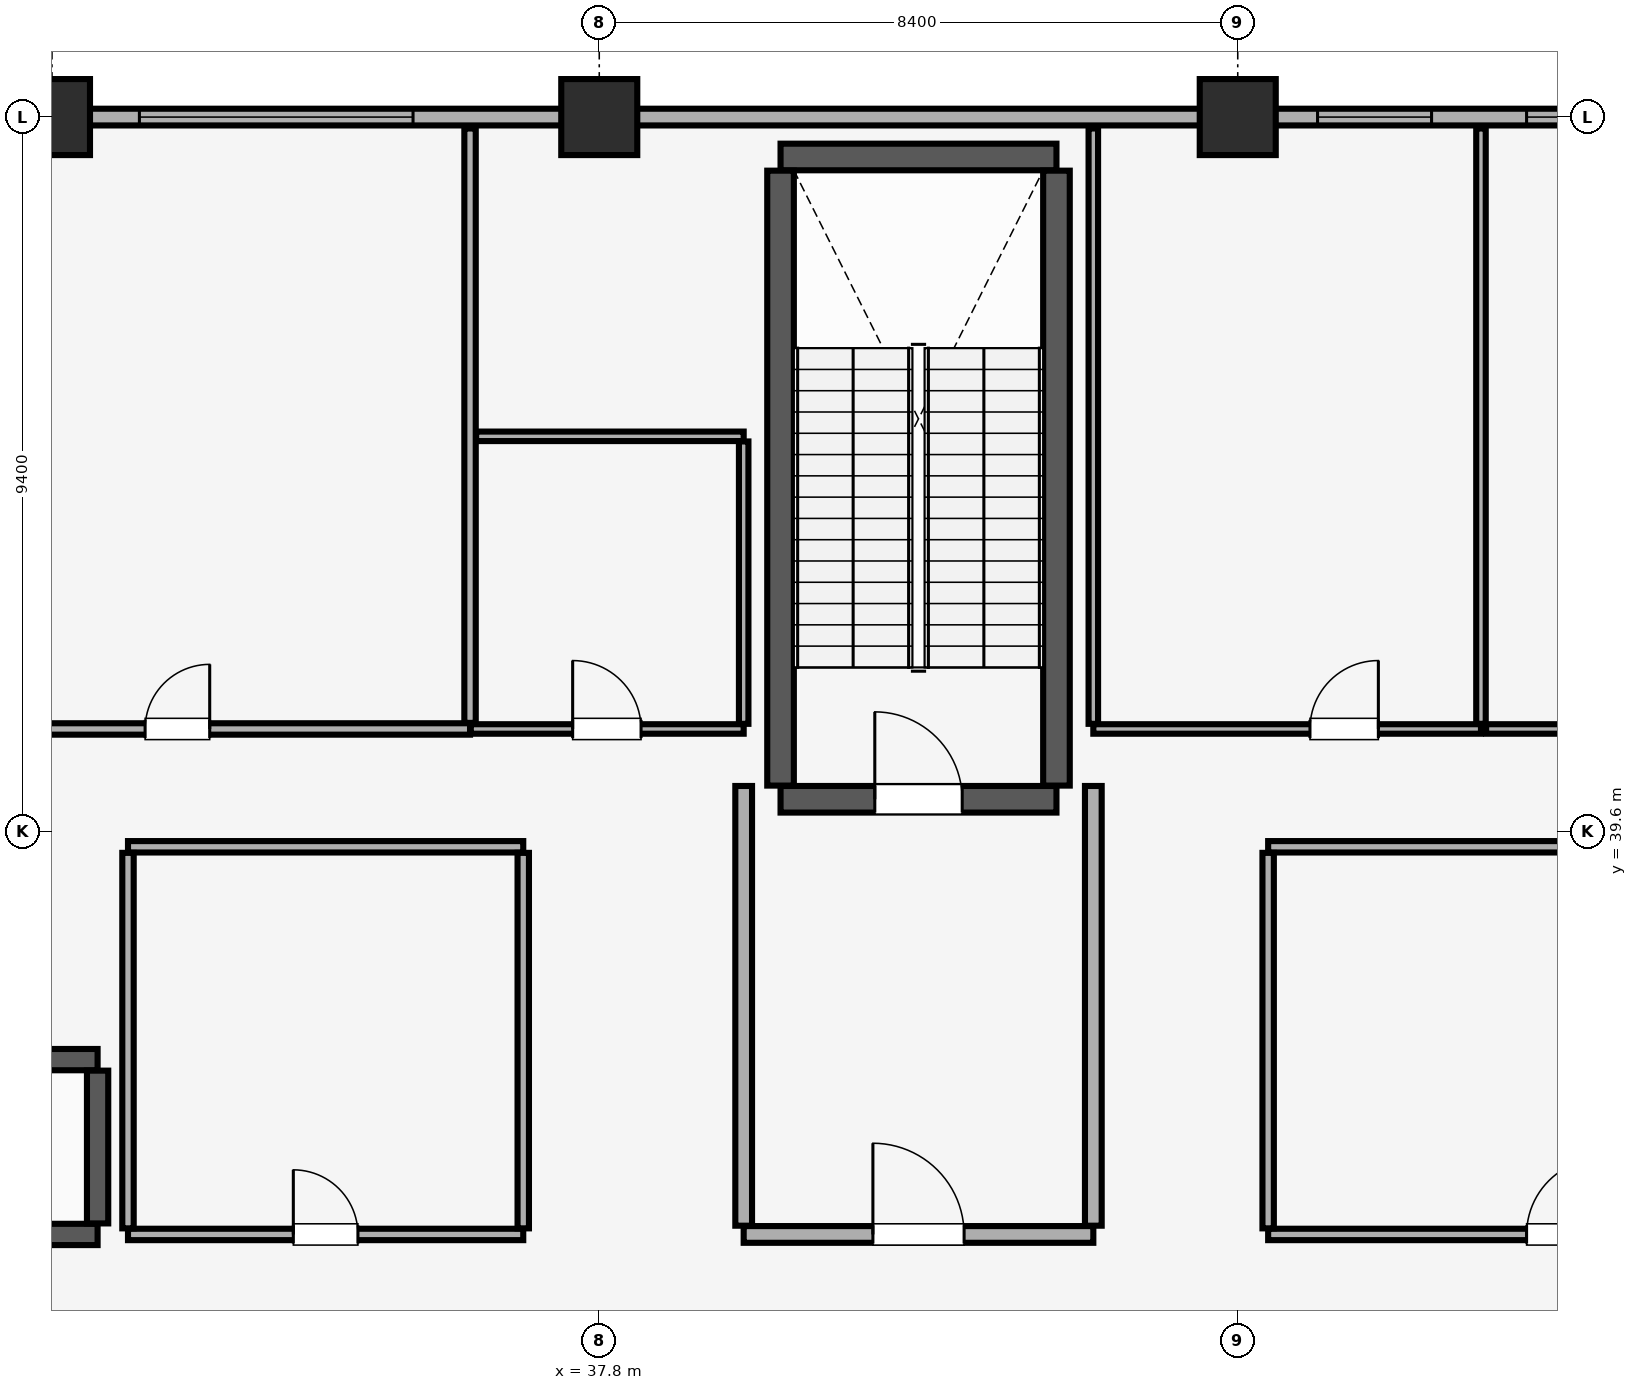
"""IFC4 building model, lengths in metres.
Left out: names, types, materials, properties, quantities, classifications, styles, units other than length and angle.
Written with IfcOpenShell. Run it as: python <this file> out.ifc"""

import sys

from ifc_helpers import new_model, si_unit, direction, frame, frame_2d, origin, origin_2d, place, context, subcontext, project, spatial, rectangle, extrude, element, fill, save


model = new_model("IFC4")
c1 = context("Model", 3, precision=1e-05, world=origin(), true_north=direction((0.0, 1.0)))
c2 = subcontext(c1, "Body", "Model", "MODEL_VIEW")
j1 = project(units=[si_unit("LENGTHUNIT", "METRE"), si_unit("PLANEANGLEUNIT", "RADIAN")], contexts=[c1])
p1 = place(None, origin())
s1 = spatial("IfcSite", under=j1, at=p1, CompositionType="ELEMENT")
p2 = place(p1, origin())
s2 = spatial("IfcBuilding", under=s1, at=p2, CompositionType="ELEMENT")
p3 = place(p2, frame((0.0, 0.0, 294.7)))
s3 = spatial("IfcBuildingStorey", under=s2, at=p3, CompositionType="ELEMENT", Elevation=294.7)
for number, where, z_axis, x_axis in (
    (1, (30.6, 49.0, 0.0), (0.0, 0.0, 1.0), (1.0, 0.0, 0.0)),
    (2, (37.8, 49.0, 0.0), (0.0, 0.0, 1.0), (1.0, 0.0, 0.0)),
    (3, (46.2, 49.0, 0.0), (0.0, 0.0, 1.0), (1.0, 0.0, 0.0)),
):
    element("IfcColumn", number, at=place(p3, frame(where, z_axis=z_axis, x_axis=x_axis)), inside=s3, PredefinedType="COLUMN", context=c2, shape_type="SweptSolid", body=[
        extrude(rectangle(XDim=1.0, YDim=1.0, at=origin_2d()), origin(), (0.0, 0.0, 1.0), 5.12),
    ])
p4 = place(p3, frame((71.4, 49.0, 0.0), z_axis=(0.0, 0.0, 1.0), x_axis=(-1.0, 0.0, 0.0)))
e4 = element("IfcWall", 4, at=p4, inside=s3, PredefinedType="SOLIDWALL", context=c2, shape_type="SweptSolid", body=[
    extrude(rectangle(XDim=58.8, YDim=0.22, at=frame_2d((29.4, 0.0))), origin(), (0.0, 0.0, 1.0), 4.32),
])
p5 = place(p4, frame((56.365, 0.0, 0.85)))
e5 = element("IfcOpeningElement", 5, at=p5, cuts=e4, PredefinedType="OPENING", context=c2, shape_type="SweptSolid", body=[
    extrude(rectangle(XDim=1.5, YDim=1.4, at=frame_2d((0.75, 0.7))), frame((0.0, 0.12, 0.0), z_axis=(0.0, -1.0, 0.0), x_axis=(1.0, 0.0, 0.0)), (0.0, 0.0, 1.0), 0.24),
])
p6 = place(p4, frame((0.935, 0.0, 0.85)))
e6 = element("IfcOpeningElement", 6, at=p6, cuts=e4, PredefinedType="OPENING", context=c2, shape_type="SweptSolid", body=[
    extrude(rectangle(XDim=1.5, YDim=1.4, at=frame_2d((0.75, 0.7))), frame((0.0, 0.12, 0.0), z_axis=(0.0, -1.0, 0.0), x_axis=(1.0, 0.0, 0.0)), (0.0, 0.0, 1.0), 0.24),
])
p7 = place(p4, frame((43.865, 0.0, 0.9)))
e7 = element("IfcOpeningElement", 7, at=p7, cuts=e4, PredefinedType="OPENING", context=c2, shape_type="SweptSolid", body=[
    extrude(rectangle(XDim=1.5, YDim=1.4, at=frame_2d((0.75, 0.7))), frame((0.0, 0.12, 0.0), z_axis=(0.0, -1.0, 0.0), x_axis=(1.0, 0.0, 0.0)), (0.0, 0.0, 1.0), 0.24),
])
p8 = place(p4, frame((36.05, 0.0, 0.9)))
e8 = element("IfcOpeningElement", 8, at=p8, cuts=e4, PredefinedType="OPENING", context=c2, shape_type="SweptSolid", body=[
    extrude(rectangle(XDim=3.6, YDim=1.5, at=frame_2d((1.8, 0.75))), frame((0.0, 0.12, 0.0), z_axis=(0.0, -1.0, 0.0), x_axis=(1.0, 0.0, 0.0)), (0.0, 0.0, 1.0), 0.24),
])
p9 = place(p4, frame((22.65, 0.0, 0.9)))
e9 = element("IfcOpeningElement", 9, at=p9, cuts=e4, PredefinedType="OPENING", context=c2, shape_type="SweptSolid", body=[
    extrude(rectangle(XDim=1.5, YDim=1.4, at=frame_2d((0.75, 0.7))), frame((0.0, 0.12, 0.0), z_axis=(0.0, -1.0, 0.0), x_axis=(1.0, 0.0, 0.0)), (0.0, 0.0, 1.0), 0.24),
])
p10 = place(p4, frame((19.0, 0.0, 0.9)))
e10 = element("IfcOpeningElement", 10, at=p10, cuts=e4, PredefinedType="OPENING", context=c2, shape_type="SweptSolid", body=[
    extrude(rectangle(XDim=2.4, YDim=1.5, at=frame_2d((1.2, 0.75))), frame((0.0, 0.12, 0.0), z_axis=(0.0, -1.0, 0.0), x_axis=(1.0, 0.0, 0.0)), (0.0, 0.0, 1.0), 0.24),
])
p11 = place(p4, frame((14.635, 0.0, 0.9)))
e11 = element("IfcOpeningElement", 11, at=p11, cuts=e4, PredefinedType="OPENING", context=c2, shape_type="SweptSolid", body=[
    extrude(rectangle(XDim=2.4, YDim=1.5, at=frame_2d((1.2, 0.75))), frame((0.0, 0.12, 0.0), z_axis=(0.0, -1.0, 0.0), x_axis=(1.0, 0.0, 0.0)), (0.0, 0.0, 1.0), 0.24),
])
p12 = place(p3, frame((40.185, 40.025, 0.0), z_axis=(0.0, 0.0, 1.0), x_axis=(1.0, 0.0, 0.0)))
e12 = element("IfcWall", 12, at=p12, inside=s3, PredefinedType="SHEAR", context=c2, shape_type="SweptSolid", body=[
    extrude(rectangle(XDim=3.63, YDim=0.35, at=frame_2d((1.815, 0.0))), origin(), (0.0, 0.0, 1.0), 5.12),
])
p13 = place(p12, frame((1.24, 0.0, 0.0)))
e13 = element("IfcOpeningElement", 13, at=p13, cuts=e12, PredefinedType="OPENING", context=c2, shape_type="SweptSolid", body=[
    extrude(rectangle(XDim=1.15, YDim=2.15, at=frame_2d((0.575, 1.075))), frame((0.0, 0.185, 0.0), z_axis=(0.0, -1.0, 0.0), x_axis=(1.0, 0.0, 0.0)), (0.0, 0.0, 1.0), 0.37),
])
p14 = place(p3, frame((40.185, 48.475, 0.0), z_axis=(0.0, 0.0, 1.0), x_axis=(1.0, 0.0, 0.0)))
e14 = element("IfcWall", 14, at=p14, inside=s3, PredefinedType="SHEAR", context=c2, shape_type="SweptSolid", body=[
    extrude(rectangle(XDim=3.63, YDim=0.35, at=frame_2d((1.815, 0.0))), origin(), (0.0, 0.0, 1.0), 5.12),
])
for number, where, z_axis, x_axis in (
    (15, (40.185, 40.205, 0.0), (0.0, 0.0, 1.0), (0.0, 1.0, 0.0)),
    (16, (43.815, 40.205, 0.0), (0.0, 0.0, 1.0), (0.0, 1.0, 0.0)),
):
    element("IfcWall", number, at=place(p3, frame(where, z_axis=z_axis, x_axis=x_axis)), inside=s3, PredefinedType="SHEAR", context=c2, shape_type="SweptSolid", body=[
        extrude(rectangle(XDim=8.09, YDim=0.35, at=frame_2d((4.045, 0.0))), origin(), (0.0, 0.0, 1.0), 5.12),
    ])
for number, where, z_axis, x_axis in (
    (17, (28.9, 34.3, 0.0), (0.0, 0.0, 1.0), (1.0, 0.0, 0.0)),
    (18, (28.9, 36.6, 0.0), (0.0, 0.0, 1.0), (1.0, 0.0, 0.0)),
):
    element("IfcWall", number, at=place(p3, frame(where, z_axis=z_axis, x_axis=x_axis)), inside=s3, PredefinedType="SHEAR", context=c2, shape_type="SweptSolid", body=[
        extrude(rectangle(XDim=2.3, YDim=0.28, at=frame_2d((1.15, 0.0))), origin(), (0.0, 0.0, 1.0), 5.12),
    ])
p15 = place(p3, frame((31.2, 34.445, 0.0), z_axis=(0.0, 0.0, 1.0), x_axis=(0.0, 1.0, 0.0)))
e19 = element("IfcWall", 19, at=p15, inside=s3, PredefinedType="SHEAR", context=c2, shape_type="SweptSolid", body=[
    extrude(rectangle(XDim=2.01, YDim=0.28, at=frame_2d((1.005, 0.0))), origin(), (0.0, 0.0, 1.0), 5.12),
])
p16 = place(p3, frame((39.7, 34.3, 0.0), z_axis=(0.0, 0.0, 1.0), x_axis=(1.0, 0.0, 0.0)))
e20 = element("IfcWall", 20, at=p16, inside=s3, PredefinedType="PARTITIONING", context=c2, shape_type="SweptSolid", body=[
    extrude(rectangle(XDim=4.6, YDim=0.22, at=frame_2d((2.3, 0.0))), origin(), (0.0, 0.0, 1.0), 5.12),
])
p17 = place(p16, frame((1.7, 0.0, 0.0)))
e21 = element("IfcOpeningElement", 21, at=p17, cuts=e20, PredefinedType="OPENING", context=c2, shape_type="SweptSolid", body=[
    extrude(rectangle(XDim=1.2, YDim=2.15, at=frame_2d((0.6, 1.075))), frame((0.0, 0.12, 0.0), z_axis=(0.0, -1.0, 0.0), x_axis=(1.0, 0.0, 0.0)), (0.0, 0.0, 1.0), 0.24),
])
for number, where, z_axis, x_axis in (
    (22, (39.7, 34.415, 0.0), (0.0, 0.0, 1.0), (0.0, 1.0, 0.0)),
    (23, (44.3, 34.415, 0.0), (0.0, 0.0, 1.0), (0.0, 1.0, 0.0)),
):
    element("IfcWall", number, at=place(p3, frame(where, z_axis=z_axis, x_axis=x_axis)), inside=s3, PredefinedType="PARTITIONING", context=c2, shape_type="SweptSolid", body=[
        extrude(rectangle(XDim=5.785, YDim=0.22, at=frame_2d((2.893, 0.0))), origin(), (0.0, 0.0, 1.0), 5.12),
    ])
p18 = place(p3, frame((31.6, 34.3, 0.0), z_axis=(0.0, 0.0, 1.0), x_axis=(1.0, 0.0, 0.0)))
e24 = element("IfcWall", 24, at=p18, inside=s3, PredefinedType="PARTITIONING", context=c2, shape_type="SweptSolid", body=[
    extrude(rectangle(XDim=5.2, YDim=0.15, at=frame_2d((2.6, 0.0))), origin(), (0.0, 0.0, 1.0), 5.12),
])
p19 = place(p18, frame((2.175, 0.0, 0.0)))
e25 = element("IfcOpeningElement", 25, at=p19, cuts=e24, PredefinedType="OPENING", context=c2, shape_type="SweptSolid", body=[
    extrude(rectangle(XDim=0.85, YDim=2.1, at=frame_2d((0.425, 1.05))), frame((0.0, 0.085, 0.0), z_axis=(0.0, -1.0, 0.0), x_axis=(1.0, 0.0, 0.0)), (0.0, 0.0, 1.0), 0.17),
])
p20 = place(p3, frame((31.6, 39.4, 0.0), z_axis=(0.0, 0.0, 1.0), x_axis=(1.0, 0.0, 0.0)))
e26 = element("IfcWall", 26, at=p20, inside=s3, PredefinedType="PARTITIONING", context=c2, shape_type="SweptSolid", body=[
    extrude(rectangle(XDim=5.2, YDim=0.15, at=frame_2d((2.6, 0.0))), origin(), (0.0, 0.0, 1.0), 5.12),
])
for number, where, z_axis, x_axis in (
    (27, (31.6, 34.38, 0.0), (0.0, 0.0, 1.0), (0.0, 1.0, 0.0)),
    (28, (36.8, 34.38, 0.0), (0.0, 0.0, 1.0), (0.0, 1.0, 0.0)),
):
    element("IfcWall", number, at=place(p3, frame(where, z_axis=z_axis, x_axis=x_axis)), inside=s3, PredefinedType="PARTITIONING", context=c2, shape_type="SweptSolid", body=[
        extrude(rectangle(XDim=4.94, YDim=0.15, at=frame_2d((2.47, 0.0))), origin(), (0.0, 0.0, 1.0), 5.12),
    ])
p21 = place(p3, frame((46.6, 34.3, 0.0), z_axis=(0.0, 0.0, 1.0), x_axis=(1.0, 0.0, 0.0)))
e29 = element("IfcWall", 29, at=p21, inside=s3, PredefinedType="PARTITIONING", context=c2, shape_type="SweptSolid", body=[
    extrude(rectangle(XDim=7.95, YDim=0.15, at=frame_2d((3.975, 0.0))), origin(), (0.0, 0.0, 1.0), 5.12),
])
p22 = place(p21, frame((3.4, 0.0, 0.0)))
e30 = element("IfcOpeningElement", 30, at=p22, cuts=e29, PredefinedType="OPENING", context=c2, shape_type="SweptSolid", body=[
    extrude(rectangle(XDim=1.0, YDim=2.15, at=frame_2d((0.5, 1.075))), frame((0.0, 0.085, 0.0), z_axis=(0.0, -1.0, 0.0), x_axis=(1.0, 0.0, 0.0)), (0.0, 0.0, 1.0), 0.17),
])
p23 = place(p3, frame((46.6, 39.4, 0.0), z_axis=(0.0, 0.0, 1.0), x_axis=(1.0, 0.0, 0.0)))
e31 = element("IfcWall", 31, at=p23, inside=s3, PredefinedType="PARTITIONING", context=c2, shape_type="SweptSolid", body=[
    extrude(rectangle(XDim=7.95, YDim=0.15, at=frame_2d((3.975, 0.0))), origin(), (0.0, 0.0, 1.0), 5.12),
])
p24 = place(p3, frame((46.6, 34.38, 0.0), z_axis=(0.0, 0.0, 1.0), x_axis=(0.0, 1.0, 0.0)))
e32 = element("IfcWall", 32, at=p24, inside=s3, PredefinedType="PARTITIONING", context=c2, shape_type="SweptSolid", body=[
    extrude(rectangle(XDim=4.94, YDim=0.15, at=frame_2d((2.47, 0.0))), origin(), (0.0, 0.0, 1.0), 5.12),
])
p25 = place(p3, frame((28.41, 40.95, 0.0), z_axis=(0.0, 0.0, 1.0), x_axis=(1.0, 0.0, 0.0)))
e33 = element("IfcWall", 33, at=p25, inside=s3, PredefinedType="PARTITIONING", context=c2, shape_type="SweptSolid", body=[
    extrude(rectangle(XDim=7.69, YDim=0.15, at=frame_2d((3.845, 0.0))), origin(), (0.0, 0.0, 1.0), 5.12),
])
p26 = place(p25, frame((3.415, 0.0, 0.0)))
e34 = element("IfcOpeningElement", 34, at=p26, cuts=e33, PredefinedType="OPENING", context=c2, shape_type="SweptSolid", body=[
    extrude(rectangle(XDim=0.85, YDim=2.1, at=frame_2d((0.425, 1.05))), frame((0.0, 0.085, 0.0), z_axis=(0.0, -1.0, 0.0), x_axis=(1.0, 0.0, 0.0)), (0.0, 0.0, 1.0), 0.17),
])
p27 = place(p3, frame((36.1, 41.03, 0.0), z_axis=(0.0, 0.0, 1.0), x_axis=(0.0, 1.0, 0.0)))
e35 = element("IfcWall", 35, at=p27, inside=s3, PredefinedType="PARTITIONING", context=c2, shape_type="SweptSolid", body=[
    extrude(rectangle(XDim=7.82, YDim=0.15, at=frame_2d((3.91, 0.0))), origin(), (0.0, 0.0, 1.0), 5.12),
])
p28 = place(p3, frame((36.11, 40.95, 0.0), z_axis=(0.0, 0.0, 1.0), x_axis=(1.0, 0.0, 0.0)))
e36 = element("IfcWall", 36, at=p28, inside=s3, PredefinedType="PARTITIONING", context=c2, shape_type="SweptSolid", body=[
    extrude(rectangle(XDim=3.59, YDim=0.125, at=frame_2d((1.795, 0.0))), origin(), (0.0, 0.0, 1.0), 5.12),
])
p29 = place(p28, frame((1.34, 0.0, 0.0)))
e37 = element("IfcOpeningElement", 37, at=p29, cuts=e36, PredefinedType="OPENING", context=c2, shape_type="SweptSolid", body=[
    extrude(rectangle(XDim=0.9, YDim=2.1, at=frame_2d((0.45, 1.05))), frame((0.0, 0.073, 0.0), z_axis=(0.0, -1.0, 0.0), x_axis=(1.0, 0.0, 0.0)), (0.0, 0.0, 1.0), 0.145),
])
p30 = place(p3, frame((36.18, 44.8, 0.0), z_axis=(0.0, 0.0, 1.0), x_axis=(1.0, 0.0, 0.0)))
e38 = element("IfcWall", 38, at=p30, inside=s3, PredefinedType="PARTITIONING", context=c2, shape_type="SweptSolid", body=[
    extrude(rectangle(XDim=3.52, YDim=0.125, at=frame_2d((1.76, 0.0))), origin(), (0.0, 0.0, 1.0), 5.12),
])
p31 = place(p3, frame((39.7, 41.018, 0.0), z_axis=(0.0, 0.0, 1.0), x_axis=(0.0, 1.0, 0.0)))
e39 = element("IfcWall", 39, at=p31, inside=s3, PredefinedType="PARTITIONING", context=c2, shape_type="SweptSolid", body=[
    extrude(rectangle(XDim=3.715, YDim=0.125, at=frame_2d((1.857, 0.0))), origin(), (0.0, 0.0, 1.0), 5.12),
])
p32 = place(p3, frame((44.3, 40.95, 0.0), z_axis=(0.0, 0.0, 1.0), x_axis=(1.0, 0.0, 0.0)))
e40 = element("IfcWall", 40, at=p32, inside=s3, PredefinedType="PARTITIONING", context=c2, shape_type="SweptSolid", body=[
    extrude(rectangle(XDim=5.1, YDim=0.125, at=frame_2d((2.55, 0.0))), origin(), (0.0, 0.0, 1.0), 5.12),
])
p33 = place(p32, frame((2.85, 0.0, 0.0)))
e41 = element("IfcOpeningElement", 41, at=p33, cuts=e40, PredefinedType="OPENING", context=c2, shape_type="SweptSolid", body=[
    extrude(rectangle(XDim=0.9, YDim=2.1, at=frame_2d((0.45, 1.05))), frame((0.0, 0.073, 0.0), z_axis=(0.0, -1.0, 0.0), x_axis=(1.0, 0.0, 0.0)), (0.0, 0.0, 1.0), 0.145),
])
for number, where, z_axis, x_axis in (
    (42, (44.3, 41.018, 0.0), (0.0, 0.0, 1.0), (0.0, 1.0, 0.0)),
    (43, (49.4, 41.018, 0.0), (0.0, 0.0, 1.0), (0.0, 1.0, 0.0)),
):
    element("IfcWall", number, at=place(p3, frame(where, z_axis=z_axis, x_axis=x_axis)), inside=s3, PredefinedType="PARTITIONING", context=c2, shape_type="SweptSolid", body=[
        extrude(rectangle(XDim=7.833, YDim=0.125, at=frame_2d((3.916, 0.0))), origin(), (0.0, 0.0, 1.0), 5.12),
    ])
p34 = place(p3, frame((49.468, 40.95, 0.0), z_axis=(0.0, 0.0, 1.0), x_axis=(1.0, 0.0, 0.0)))
e44 = element("IfcWall", 44, at=p34, inside=s3, PredefinedType="PARTITIONING", context=c2, shape_type="SweptSolid", body=[
    extrude(rectangle(XDim=8.032, YDim=0.125, at=frame_2d((4.016, 0.0))), origin(), (0.0, 0.0, 1.0), 5.12),
])
p35 = place(p34, frame((4.782, 0.0, 0.0)))
e45 = element("IfcOpeningElement", 45, at=p35, cuts=e44, PredefinedType="OPENING", context=c2, shape_type="SweptSolid", body=[
    extrude(rectangle(XDim=0.9, YDim=2.1, at=frame_2d((0.45, 1.05))), frame((0.0, 0.073, 0.0), z_axis=(0.0, -1.0, 0.0), x_axis=(1.0, 0.0, 0.0)), (0.0, 0.0, 1.0), 0.145),
])
p36 = place(p8, origin())
e46 = element("IfcWindow", 46, at=p36, inside=s3, PartitioningType="SINGLE_PANEL", PredefinedType="WINDOW", context=c2, shape_type="SweptSolid", body=[
    extrude(rectangle(XDim=3.6, YDim=1.5, at=frame_2d((1.8, 0.75))), frame((0.0, 0.03, 0.0), z_axis=(0.0, -1.0, 0.0), x_axis=(1.0, 0.0, 0.0)), (0.0, 0.0, 1.0), 0.06),
])
fill(e8, e46)
p37 = place(p9, origin())
e47 = element("IfcWindow", 47, at=p37, inside=s3, PartitioningType="SINGLE_PANEL", PredefinedType="WINDOW", context=c2, shape_type="SweptSolid", body=[
    extrude(rectangle(XDim=1.5, YDim=1.4, at=frame_2d((0.75, 0.7))), frame((0.0, 0.03, 0.0), z_axis=(0.0, -1.0, 0.0), x_axis=(1.0, 0.0, 0.0)), (0.0, 0.0, 1.0), 0.06),
])
fill(e9, e47)
p38 = place(p10, origin())
e48 = element("IfcWindow", 48, at=p38, inside=s3, PartitioningType="SINGLE_PANEL", PredefinedType="WINDOW", context=c2, shape_type="SweptSolid", body=[
    extrude(rectangle(XDim=2.4, YDim=1.5, at=frame_2d((1.2, 0.75))), frame((0.0, 0.03, 0.0), z_axis=(0.0, -1.0, 0.0), x_axis=(1.0, 0.0, 0.0)), (0.0, 0.0, 1.0), 0.06),
])
fill(e10, e48)
p39 = place(p13, origin())
e49 = element("IfcDoor", 49, at=p39, inside=s3, OperationType="SINGLE_SWING_LEFT", PredefinedType="DOOR", context=c2, shape_type="SweptSolid", body=[
    extrude(rectangle(XDim=1.15, YDim=2.15, at=frame_2d((0.575, 1.075))), frame((0.0, 0.025, 0.0), z_axis=(0.0, -1.0, 0.0), x_axis=(1.0, 0.0, 0.0)), (0.0, 0.0, 1.0), 0.05),
])
fill(e13, e49)
p40 = place(p17, origin())
e50 = element("IfcDoor", 50, at=p40, inside=s3, OperationType="SINGLE_SWING_LEFT", PredefinedType="DOOR", context=c2, shape_type="SweptSolid", body=[
    extrude(rectangle(XDim=1.2, YDim=2.15, at=frame_2d((0.6, 1.075))), frame((0.0, 0.025, 0.0), z_axis=(0.0, -1.0, 0.0), x_axis=(1.0, 0.0, 0.0)), (0.0, 0.0, 1.0), 0.05),
])
fill(e21, e50)
p41 = place(p19, origin())
e51 = element("IfcDoor", 51, at=p41, inside=s3, OperationType="SINGLE_SWING_LEFT", PredefinedType="DOOR", context=c2, shape_type="SweptSolid", body=[
    extrude(rectangle(XDim=0.85, YDim=2.1, at=frame_2d((0.425, 1.05))), frame((0.0, 0.025, 0.0), z_axis=(0.0, -1.0, 0.0), x_axis=(1.0, 0.0, 0.0)), (0.0, 0.0, 1.0), 0.05),
])
fill(e25, e51)
p42 = place(p22, origin())
e52 = element("IfcDoor", 52, at=p42, inside=s3, OperationType="SINGLE_SWING_RIGHT", PredefinedType="DOOR", context=c2, shape_type="SweptSolid", body=[
    extrude(rectangle(XDim=1.0, YDim=2.15, at=frame_2d((0.5, 1.075))), frame((0.0, 0.025, 0.0), z_axis=(0.0, -1.0, 0.0), x_axis=(1.0, 0.0, 0.0)), (0.0, 0.0, 1.0), 0.05),
])
fill(e30, e52)
p43 = place(p26, origin())
e53 = element("IfcDoor", 53, at=p43, inside=s3, OperationType="SINGLE_SWING_RIGHT", PredefinedType="DOOR", context=c2, shape_type="SweptSolid", body=[
    extrude(rectangle(XDim=0.85, YDim=2.1, at=frame_2d((0.425, 1.05))), frame((0.0, 0.025, 0.0), z_axis=(0.0, -1.0, 0.0), x_axis=(1.0, 0.0, 0.0)), (0.0, 0.0, 1.0), 0.05),
])
fill(e34, e53)
p44 = place(p29, origin())
e54 = element("IfcDoor", 54, at=p44, inside=s3, OperationType="SINGLE_SWING_LEFT", PredefinedType="DOOR", context=c2, shape_type="SweptSolid", body=[
    extrude(rectangle(XDim=0.9, YDim=2.1, at=frame_2d((0.45, 1.05))), frame((0.0, 0.025, 0.0), z_axis=(0.0, -1.0, 0.0), x_axis=(1.0, 0.0, 0.0)), (0.0, 0.0, 1.0), 0.05),
])
fill(e37, e54)
p45 = place(p33, origin())
e55 = element("IfcDoor", 55, at=p45, inside=s3, OperationType="SINGLE_SWING_RIGHT", PredefinedType="DOOR", context=c2, shape_type="SweptSolid", body=[
    extrude(rectangle(XDim=0.9, YDim=2.1, at=frame_2d((0.45, 1.05))), frame((0.0, 0.025, 0.0), z_axis=(0.0, -1.0, 0.0), x_axis=(1.0, 0.0, 0.0)), (0.0, 0.0, 1.0), 0.05),
])
fill(e41, e55)
save(model, sys.argv[1])
